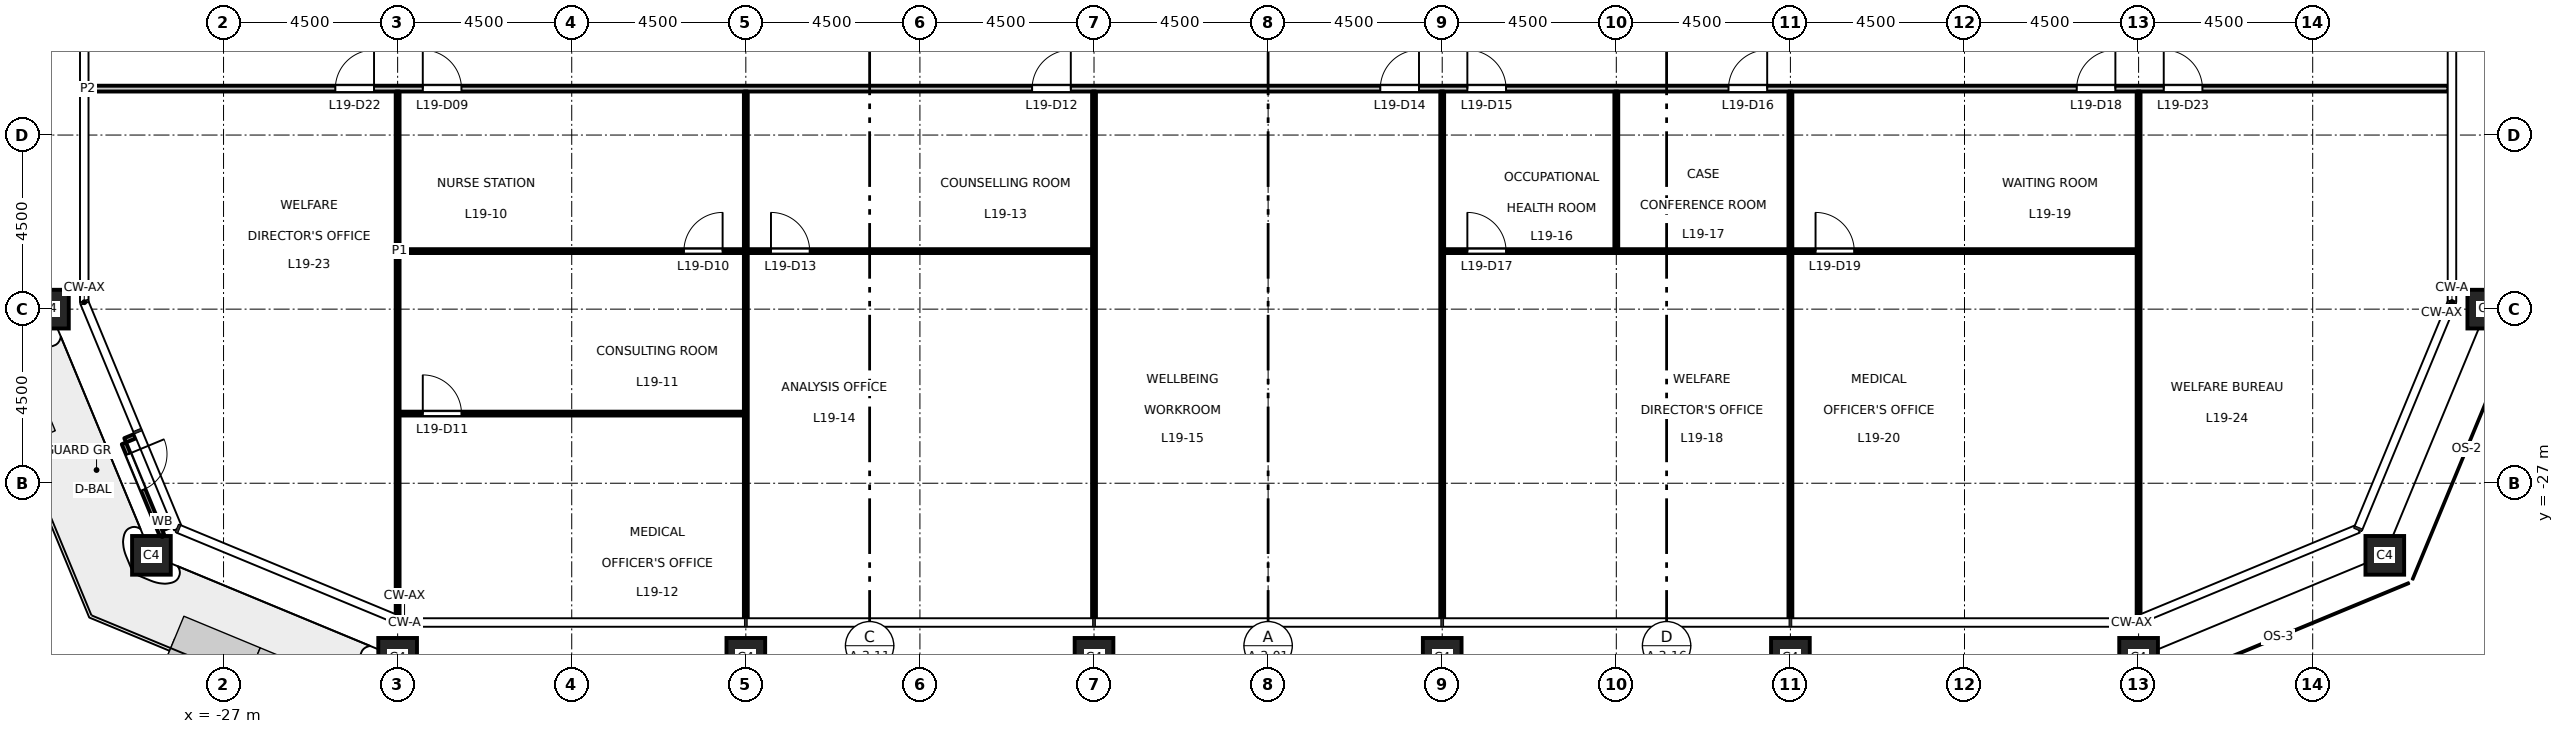
"""IFC4 building model, lengths in metres.
Left out: names, types, materials, properties, quantities, classifications, styles, units other than length and angle.
Written with IfcOpenShell. Run it as: python <this file> out.ifc"""

import sys

from ifc_helpers import new_model, si_unit, direction, frame, frame_2d, origin, origin_2d, place, context, subcontext, project, spatial, rectangle, hollow_rectangle, extrude, element, fill, save


model = new_model("IFC4")
c1 = context("Model", 3, precision=1e-05, world=origin(), true_north=direction((0.0, 1.0)))
c2 = subcontext(c1, "Body", "Model", "MODEL_VIEW")
j1 = project(units=[si_unit("LENGTHUNIT", "METRE"), si_unit("PLANEANGLEUNIT", "RADIAN")], contexts=[c1])
p1 = place(None, origin())
s1 = spatial("IfcSite", under=j1, at=p1, CompositionType="ELEMENT")
p2 = place(p1, origin())
s2 = spatial("IfcBuilding", under=s1, at=p2, CompositionType="ELEMENT")
p3 = place(p2, frame((0.0, 0.0, 89.7)))
s3 = spatial("IfcBuildingStorey", under=s2, at=p3, CompositionType="ELEMENT", Elevation=89.7)
for number, where, z_axis, x_axis in (
    (1, (-22.5, -31.5, 0.0), (0.0, 0.0, 1.0), (1.0, 0.0, 0.0)),
    (2, (-13.5, -31.5, 0.0), (0.0, 0.0, 1.0), (1.0, 0.0, 0.0)),
    (3, (-4.5, -31.5, 0.0), (0.0, 0.0, 1.0), (1.0, 0.0, 0.0)),
    (4, (4.5, -31.5, 0.0), (0.0, 0.0, 1.0), (1.0, 0.0, 0.0)),
    (5, (13.5, -31.5, 0.0), (0.0, 0.0, 1.0), (1.0, 0.0, 0.0)),
    (6, (22.5, -31.5, 0.0), (0.0, 0.0, 1.0), (1.0, 0.0, 0.0)),
    (7, (28.864, -28.864, 0.0), (0.0, 0.0, 1.0), (1.0, 0.0, 0.0)),
    (8, (31.5, -22.5, 0.0), (0.0, 0.0, 1.0), (1.0, 0.0, 0.0)),
    (9, (-31.5, -22.5, 0.0), (0.0, 0.0, 1.0), (1.0, 0.0, 0.0)),
    (10, (-28.864, -28.864, 0.0), (0.0, 0.0, 1.0), (1.0, 0.0, 0.0)),
):
    element("IfcColumn", number, at=place(p3, frame(where, z_axis=z_axis, x_axis=x_axis)), inside=s3, PredefinedType="COLUMN", context=c2, shape_type="SweptSolid", body=[
        extrude(hollow_rectangle(XDim=1.0, YDim=1.0, WallThickness=0.06, at=origin_2d()), origin(), (0.0, 0.0, 1.0), 4.5),
    ])
p4 = place(p3, frame((-29.285, -25.783, 0.0), z_axis=(0.0, 0.0, 1.0), x_axis=(-0.923772220778, -0.382942403136, 0.0)))
e11 = element("IfcWall", 11, at=p4, inside=s3, PredefinedType="STANDARD", context=c2, shape_type="SweptSolid", body=[
    extrude(rectangle(XDim=0.28, YDim=0.12, at=frame_2d((0.14, 0.0))), origin(), (0.0, 0.0, 1.0), 4.3),
])
p5 = place(p3, frame((-28.343, -28.058, 0.0), z_axis=(0.0, 0.0, 1.0), x_axis=(-0.923899985553, -0.382634050621, 0.0)))
e12 = element("IfcWall", 12, at=p5, inside=s3, PredefinedType="STANDARD", context=c2, shape_type="SweptSolid", body=[
    extrude(rectangle(XDim=0.28, YDim=0.12, at=frame_2d((0.14, 0.0))), origin(), (0.0, 0.0, 1.0), 4.3),
])
p6 = place(p3, frame((-29.576, -25.969, 0.0), z_axis=(0.0, 0.0, 1.0), x_axis=(0.382648460137, -0.923894017707, 0.0)))
e13 = element("IfcWall", 13, at=p6, inside=s3, PredefinedType="STANDARD", context=c2, shape_type="SweptSolid", body=[
    extrude(rectangle(XDim=2.592, YDim=0.12, at=frame_2d((1.296, 0.0))), origin(), (0.0, 0.0, 1.0), 4.3),
])
p7 = place(p6, frame((0.3, 0.0, 0.0)))
e14 = element("IfcOpeningElement", 14, at=p7, cuts=e13, PredefinedType="OPENING", context=c2, shape_type="SweptSolid", body=[
    extrude(rectangle(XDim=1.0, YDim=2.4, at=frame_2d((0.5, 1.2))), frame((0.0, 0.07, 0.0), z_axis=(0.0, -1.0, 0.0), x_axis=(1.0, 0.0, 0.0)), (0.0, 0.0, 1.0), 0.14),
])
p8 = place(p3, frame((-22.45, -25.2, 0.0), z_axis=(0.0, 0.0, 1.0), x_axis=(1.0, 0.0, 0.0)))
e15 = element("IfcWall", 15, at=p8, inside=s3, PredefinedType="PARTITIONING", context=c2, shape_type="SweptSolid", body=[
    extrude(rectangle(XDim=8.9, YDim=0.1, at=frame_2d((4.45, 0.0))), origin(), (0.0, 0.0, 1.0), 4.3),
])
p9 = place(p8, frame((0.6, 0.0, 0.0)))
e16 = element("IfcOpeningElement", 16, at=p9, cuts=e15, PredefinedType="OPENING", context=c2, shape_type="SweptSolid", body=[
    extrude(rectangle(XDim=1.0, YDim=2.1, at=frame_2d((0.5, 1.05))), frame((0.0, 0.06, 0.0), z_axis=(0.0, -1.0, 0.0), x_axis=(1.0, 0.0, 0.0)), (0.0, 0.0, 1.0), 0.12),
])
p10 = place(p3, frame((-22.45, -21.0, 0.0), z_axis=(0.0, 0.0, 1.0), x_axis=(1.0, 0.0, 0.0)))
e17 = element("IfcWall", 17, at=p10, inside=s3, PredefinedType="PARTITIONING", context=c2, shape_type="SweptSolid", body=[
    extrude(rectangle(XDim=17.9, YDim=0.1, at=frame_2d((8.95, 0.0))), origin(), (0.0, 0.0, 1.0), 4.3),
])
p11 = place(p10, frame((7.35, 0.0, 0.0)))
e18 = element("IfcOpeningElement", 18, at=p11, cuts=e17, PredefinedType="OPENING", context=c2, shape_type="SweptSolid", body=[
    extrude(rectangle(XDim=1.0, YDim=2.1, at=frame_2d((0.5, 1.05))), frame((0.0, 0.06, 0.0), z_axis=(0.0, -1.0, 0.0), x_axis=(1.0, 0.0, 0.0)), (0.0, 0.0, 1.0), 0.12),
])
p12 = place(p10, frame((9.6, 0.0, 0.0)))
e19 = element("IfcOpeningElement", 19, at=p12, cuts=e17, PredefinedType="OPENING", context=c2, shape_type="SweptSolid", body=[
    extrude(rectangle(XDim=1.0, YDim=2.1, at=frame_2d((0.5, 1.05))), frame((0.0, 0.06, 0.0), z_axis=(0.0, -1.0, 0.0), x_axis=(1.0, 0.0, 0.0)), (0.0, 0.0, 1.0), 0.12),
])
p13 = place(p3, frame((4.55, -21.0, 0.0), z_axis=(0.0, 0.0, 1.0), x_axis=(1.0, 0.0, 0.0)))
e20 = element("IfcWall", 20, at=p13, inside=s3, PredefinedType="PARTITIONING", context=c2, shape_type="SweptSolid", body=[
    extrude(rectangle(XDim=17.9, YDim=0.1, at=frame_2d((8.95, 0.0))), origin(), (0.0, 0.0, 1.0), 4.3),
])
p14 = place(p13, frame((0.6, 0.0, 0.0)))
e21 = element("IfcOpeningElement", 21, at=p14, cuts=e20, PredefinedType="OPENING", context=c2, shape_type="SweptSolid", body=[
    extrude(rectangle(XDim=1.0, YDim=2.1, at=frame_2d((0.5, 1.05))), frame((0.0, 0.06, 0.0), z_axis=(0.0, -1.0, 0.0), x_axis=(1.0, 0.0, 0.0)), (0.0, 0.0, 1.0), 0.12),
])
p15 = place(p13, frame((9.6, 0.0, 0.0)))
e22 = element("IfcOpeningElement", 22, at=p15, cuts=e20, PredefinedType="OPENING", context=c2, shape_type="SweptSolid", body=[
    extrude(rectangle(XDim=1.0, YDim=2.1, at=frame_2d((0.5, 1.05))), frame((0.0, 0.06, 0.0), z_axis=(0.0, -1.0, 0.0), x_axis=(1.0, 0.0, 0.0)), (0.0, 0.0, 1.0), 0.12),
])
p16 = place(p3, frame((-30.51, -16.8, 0.0), z_axis=(0.0, 0.0, 1.0), x_axis=(1.0, 0.0, 0.0)))
e23 = element("IfcWall", 23, at=p16, inside=s3, PredefinedType="PARTITIONING", context=c2, shape_type="SweptSolid", body=[
    extrude(rectangle(XDim=61.02, YDim=0.15, at=frame_2d((30.51, 0.0))), origin(), (0.0, 0.0, 1.0), 4.3),
])
p17 = place(p16, frame((8.66, 0.0, 0.0)))
e24 = element("IfcOpeningElement", 24, at=p17, cuts=e23, PredefinedType="OPENING", context=c2, shape_type="SweptSolid", body=[
    extrude(rectangle(XDim=1.0, YDim=2.1, at=frame_2d((0.5, 1.05))), frame((0.0, 0.085, 0.0), z_axis=(0.0, -1.0, 0.0), x_axis=(1.0, 0.0, 0.0)), (0.0, 0.0, 1.0), 0.17),
])
p18 = place(p16, frame((24.41, 0.0, 0.0)))
e25 = element("IfcOpeningElement", 25, at=p18, cuts=e23, PredefinedType="OPENING", context=c2, shape_type="SweptSolid", body=[
    extrude(rectangle(XDim=1.0, YDim=2.1, at=frame_2d((0.5, 1.05))), frame((0.0, 0.085, 0.0), z_axis=(0.0, -1.0, 0.0), x_axis=(1.0, 0.0, 0.0)), (0.0, 0.0, 1.0), 0.17),
])
p19 = place(p16, frame((33.41, 0.0, 0.0)))
e26 = element("IfcOpeningElement", 26, at=p19, cuts=e23, PredefinedType="OPENING", context=c2, shape_type="SweptSolid", body=[
    extrude(rectangle(XDim=1.0, YDim=2.1, at=frame_2d((0.5, 1.05))), frame((0.0, 0.085, 0.0), z_axis=(0.0, -1.0, 0.0), x_axis=(1.0, 0.0, 0.0)), (0.0, 0.0, 1.0), 0.17),
])
p20 = place(p16, frame((35.66, 0.0, 0.0)))
e27 = element("IfcOpeningElement", 27, at=p20, cuts=e23, PredefinedType="OPENING", context=c2, shape_type="SweptSolid", body=[
    extrude(rectangle(XDim=1.0, YDim=2.1, at=frame_2d((0.5, 1.05))), frame((0.0, 0.085, 0.0), z_axis=(0.0, -1.0, 0.0), x_axis=(1.0, 0.0, 0.0)), (0.0, 0.0, 1.0), 0.17),
])
p21 = place(p16, frame((42.41, 0.0, 0.0)))
e28 = element("IfcOpeningElement", 28, at=p21, cuts=e23, PredefinedType="OPENING", context=c2, shape_type="SweptSolid", body=[
    extrude(rectangle(XDim=1.0, YDim=2.1, at=frame_2d((0.5, 1.05))), frame((0.0, 0.085, 0.0), z_axis=(0.0, -1.0, 0.0), x_axis=(1.0, 0.0, 0.0)), (0.0, 0.0, 1.0), 0.17),
])
p22 = place(p16, frame((51.41, 0.0, 0.0)))
e29 = element("IfcOpeningElement", 29, at=p22, cuts=e23, PredefinedType="OPENING", context=c2, shape_type="SweptSolid", body=[
    extrude(rectangle(XDim=1.0, YDim=2.1, at=frame_2d((0.5, 1.05))), frame((0.0, 0.085, 0.0), z_axis=(0.0, -1.0, 0.0), x_axis=(1.0, 0.0, 0.0)), (0.0, 0.0, 1.0), 0.17),
])
p23 = place(p16, frame((6.4, 0.0, 0.0)))
e30 = element("IfcOpeningElement", 30, at=p23, cuts=e23, PredefinedType="OPENING", context=c2, shape_type="SweptSolid", body=[
    extrude(rectangle(XDim=1.0, YDim=2.1, at=frame_2d((0.5, 1.05))), frame((0.0, 0.085, 0.0), z_axis=(0.0, -1.0, 0.0), x_axis=(1.0, 0.0, 0.0)), (0.0, 0.0, 1.0), 0.17),
])
p24 = place(p16, frame((53.66, 0.0, 0.0)))
e31 = element("IfcOpeningElement", 31, at=p24, cuts=e23, PredefinedType="OPENING", context=c2, shape_type="SweptSolid", body=[
    extrude(rectangle(XDim=1.0, YDim=2.1, at=frame_2d((0.5, 1.05))), frame((0.0, 0.085, 0.0), z_axis=(0.0, -1.0, 0.0), x_axis=(1.0, 0.0, 0.0)), (0.0, 0.0, 1.0), 0.17),
])
p25 = place(p3, frame((-22.5, -30.428, 0.0), z_axis=(0.0, 0.0, 1.0), x_axis=(0.0, 1.0, 0.0)))
e32 = element("IfcWall", 32, at=p25, inside=s3, PredefinedType="PARTITIONING", context=c2, shape_type="SweptSolid", body=[
    extrude(rectangle(XDim=13.553, YDim=0.1, at=frame_2d((6.776, 0.0))), origin(), (0.0, 0.0, 1.0), 3.3),
])
p26 = place(p3, frame((-13.5, -30.51, 0.0), z_axis=(0.0, 0.0, 1.0), x_axis=(0.0, 1.0, 0.0)))
e33 = element("IfcWall", 33, at=p26, inside=s3, PredefinedType="PARTITIONING", context=c2, shape_type="SweptSolid", body=[
    extrude(rectangle(XDim=9.46, YDim=0.1, at=frame_2d((4.73, 0.0))), origin(), (0.0, 0.0, 1.0), 3.3),
])
p27 = place(p3, frame((-13.5, -20.95, 0.0), z_axis=(0.0, 0.0, 1.0), x_axis=(0.0, 1.0, 0.0)))
e34 = element("IfcWall", 34, at=p27, inside=s3, PredefinedType="PARTITIONING", context=c2, shape_type="SweptSolid", body=[
    extrude(rectangle(XDim=4.075, YDim=0.1, at=frame_2d((2.038, 0.0))), origin(), (0.0, 0.0, 1.0), 3.3),
])
for number, where, z_axis, x_axis in (
    (35, (-4.5, -30.51, 0.0), (0.0, 0.0, 1.0), (0.0, 1.0, 0.0)),
    (36, (4.5, -30.51, 0.0), (0.0, 0.0, 1.0), (0.0, 1.0, 0.0)),
):
    element("IfcWall", number, at=place(p3, frame(where, z_axis=z_axis, x_axis=x_axis)), inside=s3, PredefinedType="PARTITIONING", context=c2, shape_type="SweptSolid", body=[
        extrude(rectangle(XDim=13.635, YDim=0.1, at=frame_2d((6.817, 0.0))), origin(), (0.0, 0.0, 1.0), 3.3),
    ])
p28 = place(p3, frame((9.0, -20.95, 0.0), z_axis=(0.0, 0.0, 1.0), x_axis=(0.0, 1.0, 0.0)))
e37 = element("IfcWall", 37, at=p28, inside=s3, PredefinedType="PARTITIONING", context=c2, shape_type="SweptSolid", body=[
    extrude(rectangle(XDim=4.075, YDim=0.1, at=frame_2d((2.038, 0.0))), origin(), (0.0, 0.0, 1.0), 4.3),
])
p29 = place(p3, frame((13.5, -30.51, 0.0), z_axis=(0.0, 0.0, 1.0), x_axis=(0.0, 1.0, 0.0)))
e38 = element("IfcWall", 38, at=p29, inside=s3, PredefinedType="PARTITIONING", context=c2, shape_type="SweptSolid", body=[
    extrude(rectangle(XDim=9.46, YDim=0.1, at=frame_2d((4.73, 0.0))), origin(), (0.0, 0.0, 1.0), 3.3),
])
p30 = place(p3, frame((13.5, -20.95, 0.0), z_axis=(0.0, 0.0, 1.0), x_axis=(0.0, 1.0, 0.0)))
e39 = element("IfcWall", 39, at=p30, inside=s3, PredefinedType="PARTITIONING", context=c2, shape_type="SweptSolid", body=[
    extrude(rectangle(XDim=4.075, YDim=0.1, at=frame_2d((2.038, 0.0))), origin(), (0.0, 0.0, 1.0), 3.3),
])
p31 = place(p3, frame((22.5, -30.428, 0.0), z_axis=(0.0, 0.0, 1.0), x_axis=(0.0, 1.0, 0.0)))
e40 = element("IfcWall", 40, at=p31, inside=s3, PredefinedType="PARTITIONING", context=c2, shape_type="SweptSolid", body=[
    extrude(rectangle(XDim=13.553, YDim=0.1, at=frame_2d((6.776, 0.0))), origin(), (0.0, 0.0, 1.0), 3.3),
])
p32 = place(p7, origin())
e41 = element("IfcDoor", 41, at=p32, inside=s3, OperationType="SINGLE_SWING_LEFT", PredefinedType="DOOR", context=c2, shape_type="SweptSolid", body=[
    extrude(rectangle(XDim=1.0, YDim=2.4, at=frame_2d((0.5, 1.2))), frame((0.0, 0.025, 0.0), z_axis=(0.0, -1.0, 0.0), x_axis=(1.0, 0.0, 0.0)), (0.0, 0.0, 1.0), 0.05),
])
fill(e14, e41)
p33 = place(p17, origin())
e42 = element("IfcDoor", 42, at=p33, inside=s3, OperationType="SINGLE_SWING_LEFT", PredefinedType="DOOR", context=c2, shape_type="SweptSolid", body=[
    extrude(rectangle(XDim=1.0, YDim=2.1, at=frame_2d((0.5, 1.05))), frame((0.0, 0.025, 0.0), z_axis=(0.0, -1.0, 0.0), x_axis=(1.0, 0.0, 0.0)), (0.0, 0.0, 1.0), 0.05),
])
fill(e24, e42)
p34 = place(p11, origin())
e43 = element("IfcDoor", 43, at=p34, inside=s3, OperationType="SINGLE_SWING_RIGHT", PredefinedType="DOOR", context=c2, shape_type="SweptSolid", body=[
    extrude(rectangle(XDim=1.0, YDim=2.1, at=frame_2d((0.5, 1.05))), frame((0.0, 0.025, 0.0), z_axis=(0.0, -1.0, 0.0), x_axis=(1.0, 0.0, 0.0)), (0.0, 0.0, 1.0), 0.05),
])
fill(e18, e43)
p35 = place(p9, origin())
e44 = element("IfcDoor", 44, at=p35, inside=s3, OperationType="SINGLE_SWING_LEFT", PredefinedType="DOOR", context=c2, shape_type="SweptSolid", body=[
    extrude(rectangle(XDim=1.0, YDim=2.1, at=frame_2d((0.5, 1.05))), frame((0.0, 0.025, 0.0), z_axis=(0.0, -1.0, 0.0), x_axis=(1.0, 0.0, 0.0)), (0.0, 0.0, 1.0), 0.05),
])
fill(e16, e44)
p36 = place(p18, origin())
e45 = element("IfcDoor", 45, at=p36, inside=s3, OperationType="SINGLE_SWING_RIGHT", PredefinedType="DOOR", context=c2, shape_type="SweptSolid", body=[
    extrude(rectangle(XDim=1.0, YDim=2.1, at=frame_2d((0.5, 1.05))), frame((0.0, 0.025, 0.0), z_axis=(0.0, -1.0, 0.0), x_axis=(1.0, 0.0, 0.0)), (0.0, 0.0, 1.0), 0.05),
])
fill(e25, e45)
p37 = place(p12, origin())
e46 = element("IfcDoor", 46, at=p37, inside=s3, OperationType="SINGLE_SWING_LEFT", PredefinedType="DOOR", context=c2, shape_type="SweptSolid", body=[
    extrude(rectangle(XDim=1.0, YDim=2.1, at=frame_2d((0.5, 1.05))), frame((0.0, 0.025, 0.0), z_axis=(0.0, -1.0, 0.0), x_axis=(1.0, 0.0, 0.0)), (0.0, 0.0, 1.0), 0.05),
])
fill(e19, e46)
p38 = place(p19, origin())
e47 = element("IfcDoor", 47, at=p38, inside=s3, OperationType="SINGLE_SWING_RIGHT", PredefinedType="DOOR", context=c2, shape_type="SweptSolid", body=[
    extrude(rectangle(XDim=1.0, YDim=2.1, at=frame_2d((0.5, 1.05))), frame((0.0, 0.025, 0.0), z_axis=(0.0, -1.0, 0.0), x_axis=(1.0, 0.0, 0.0)), (0.0, 0.0, 1.0), 0.05),
])
fill(e26, e47)
p39 = place(p20, origin())
e48 = element("IfcDoor", 48, at=p39, inside=s3, OperationType="SINGLE_SWING_LEFT", PredefinedType="DOOR", context=c2, shape_type="SweptSolid", body=[
    extrude(rectangle(XDim=1.0, YDim=2.1, at=frame_2d((0.5, 1.05))), frame((0.0, 0.025, 0.0), z_axis=(0.0, -1.0, 0.0), x_axis=(1.0, 0.0, 0.0)), (0.0, 0.0, 1.0), 0.05),
])
fill(e27, e48)
p40 = place(p21, origin())
e49 = element("IfcDoor", 49, at=p40, inside=s3, OperationType="SINGLE_SWING_RIGHT", PredefinedType="DOOR", context=c2, shape_type="SweptSolid", body=[
    extrude(rectangle(XDim=1.0, YDim=2.1, at=frame_2d((0.5, 1.05))), frame((0.0, 0.025, 0.0), z_axis=(0.0, -1.0, 0.0), x_axis=(1.0, 0.0, 0.0)), (0.0, 0.0, 1.0), 0.05),
])
fill(e28, e49)
p41 = place(p14, origin())
e50 = element("IfcDoor", 50, at=p41, inside=s3, OperationType="SINGLE_SWING_LEFT", PredefinedType="DOOR", context=c2, shape_type="SweptSolid", body=[
    extrude(rectangle(XDim=1.0, YDim=2.1, at=frame_2d((0.5, 1.05))), frame((0.0, 0.025, 0.0), z_axis=(0.0, -1.0, 0.0), x_axis=(1.0, 0.0, 0.0)), (0.0, 0.0, 1.0), 0.05),
])
fill(e21, e50)
p42 = place(p22, origin())
e51 = element("IfcDoor", 51, at=p42, inside=s3, OperationType="SINGLE_SWING_RIGHT", PredefinedType="DOOR", context=c2, shape_type="SweptSolid", body=[
    extrude(rectangle(XDim=1.0, YDim=2.1, at=frame_2d((0.5, 1.05))), frame((0.0, 0.025, 0.0), z_axis=(0.0, -1.0, 0.0), x_axis=(1.0, 0.0, 0.0)), (0.0, 0.0, 1.0), 0.05),
])
fill(e29, e51)
p43 = place(p15, origin())
e52 = element("IfcDoor", 52, at=p43, inside=s3, OperationType="SINGLE_SWING_LEFT", PredefinedType="DOOR", context=c2, shape_type="SweptSolid", body=[
    extrude(rectangle(XDim=1.0, YDim=2.1, at=frame_2d((0.5, 1.05))), frame((0.0, 0.025, 0.0), z_axis=(0.0, -1.0, 0.0), x_axis=(1.0, 0.0, 0.0)), (0.0, 0.0, 1.0), 0.05),
])
fill(e22, e52)
p44 = place(p23, origin())
e53 = element("IfcDoor", 53, at=p44, inside=s3, OperationType="SINGLE_SWING_RIGHT", PredefinedType="DOOR", context=c2, shape_type="SweptSolid", body=[
    extrude(rectangle(XDim=1.0, YDim=2.1, at=frame_2d((0.5, 1.05))), frame((0.0, 0.025, 0.0), z_axis=(0.0, -1.0, 0.0), x_axis=(1.0, 0.0, 0.0)), (0.0, 0.0, 1.0), 0.05),
])
fill(e30, e53)
p45 = place(p24, origin())
e54 = element("IfcDoor", 54, at=p45, inside=s3, OperationType="SINGLE_SWING_LEFT", PredefinedType="DOOR", context=c2, shape_type="SweptSolid", body=[
    extrude(rectangle(XDim=1.0, YDim=2.1, at=frame_2d((0.5, 1.05))), frame((0.0, 0.025, 0.0), z_axis=(0.0, -1.0, 0.0), x_axis=(1.0, 0.0, 0.0)), (0.0, 0.0, 1.0), 0.05),
])
fill(e31, e54)
save(model, sys.argv[1])
